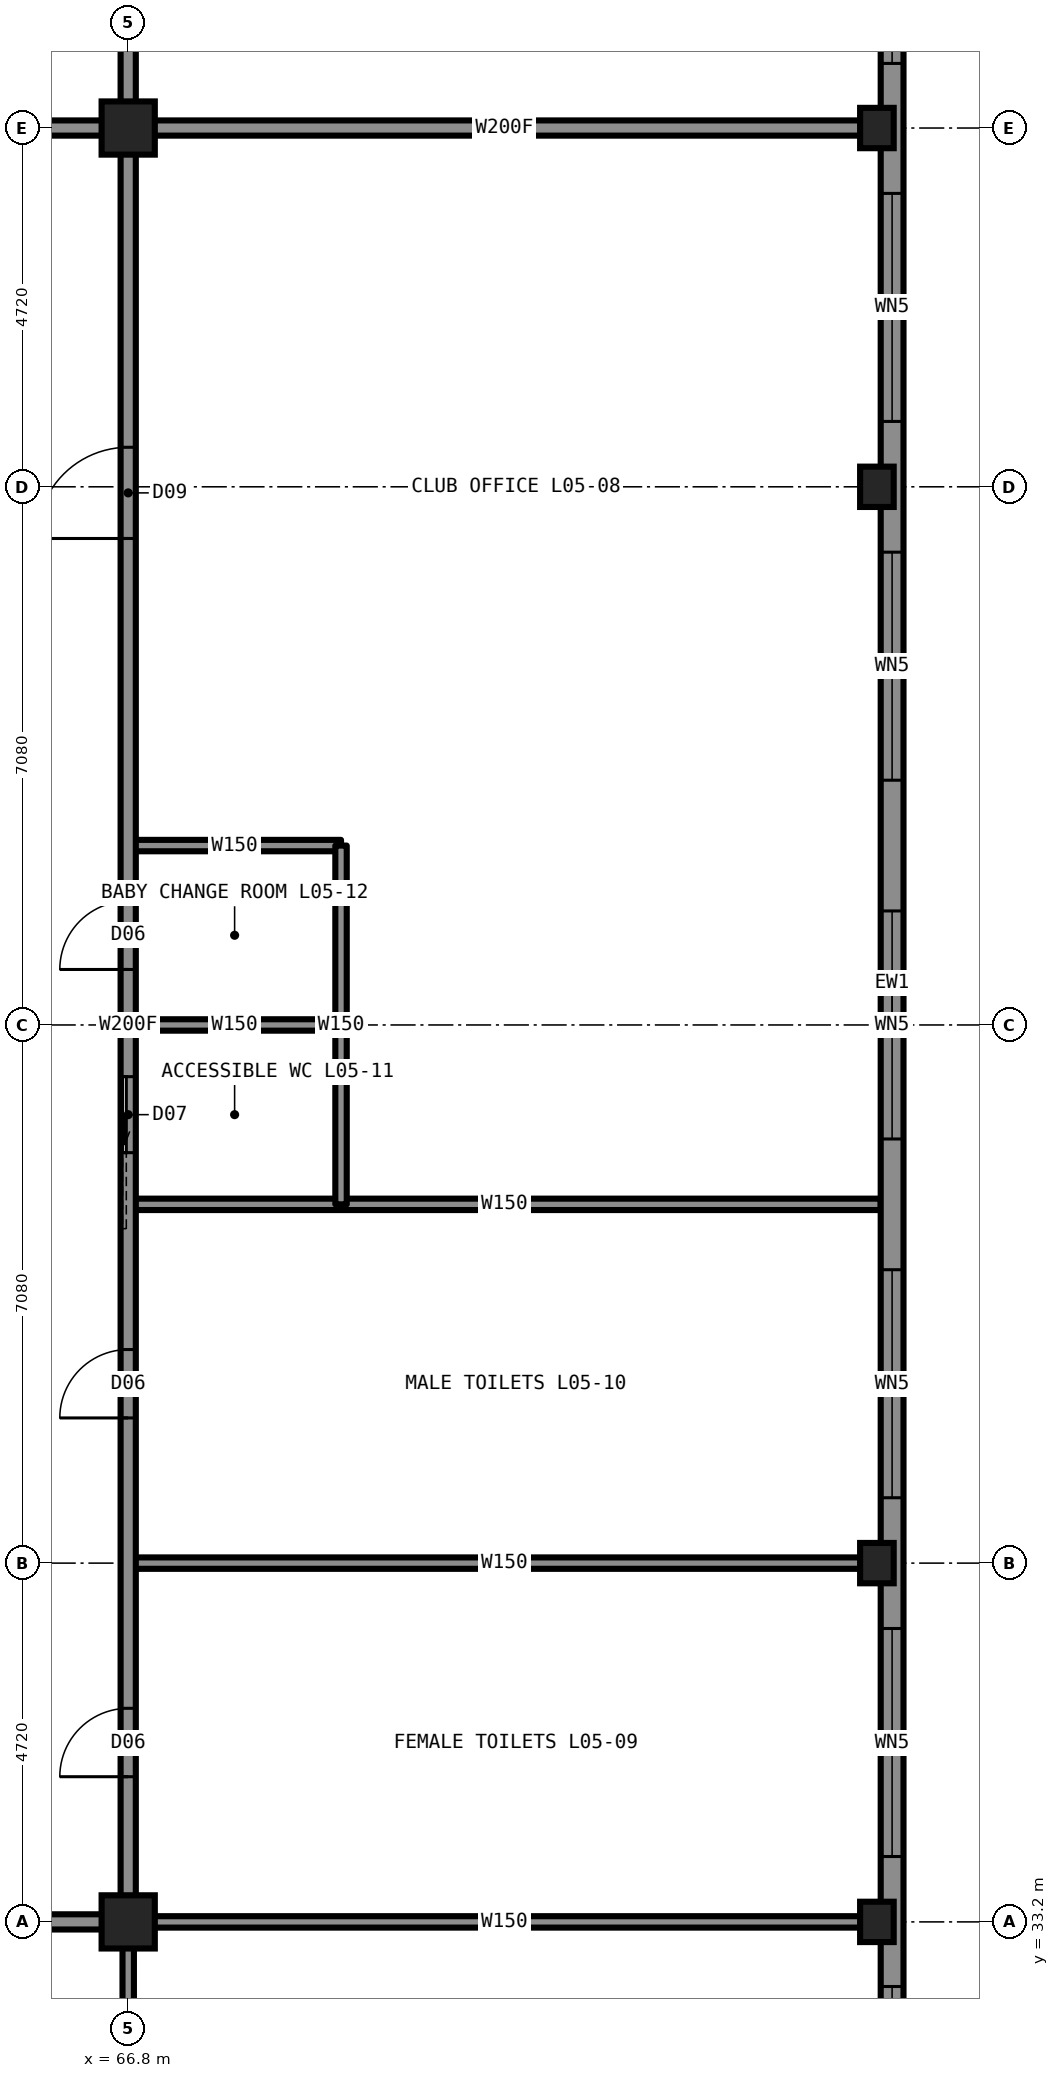
"""IFC4 building model, lengths in metres.
Left out: names, types, materials, properties, quantities, classifications, styles, units other than length and angle.
Written with IfcOpenShell. Run it as: python <this file> out.ifc"""

import sys

from ifc_helpers import new_model, si_unit, direction, frame, frame_2d, origin, origin_2d, place, context, subcontext, project, spatial, rectangle, hollow_rectangle, i_section, extrude, element, fill, save


model = new_model("IFC4")
c1 = context("Model", 3, precision=1e-05, world=origin(), true_north=direction((0.0, 1.0)))
c2 = subcontext(c1, "Body", "Model", "MODEL_VIEW")
j1 = project(units=[si_unit("LENGTHUNIT", "METRE"), si_unit("PLANEANGLEUNIT", "RADIAN")], contexts=[c1])
p1 = place(None, origin())
s1 = spatial("IfcSite", under=j1, at=p1, CompositionType="ELEMENT")
p2 = place(p1, origin())
s2 = spatial("IfcBuilding", under=s1, at=p2, CompositionType="ELEMENT")
p3 = place(p2, frame((0.0, 0.0, 25.0)))
s3 = spatial("IfcBuildingStorey", under=s2, at=p3, CompositionType="ELEMENT", Elevation=25.0)
for number, where, z_axis, x_axis in (
    (1, (76.65, 33.2, 0.0), (0.0, 0.0, 1.0), (1.0, 0.0, 0.0)),
    (2, (76.65, 37.92, 0.0), (0.0, 0.0, 1.0), (1.0, 0.0, 0.0)),
    (3, (76.65, 52.08, 0.0), (0.0, 0.0, 1.0), (1.0, 0.0, 0.0)),
    (4, (76.65, 56.8, 0.0), (0.0, 0.0, 1.0), (1.0, 0.0, 0.0)),
):
    element("IfcColumn", number, at=place(p3, frame(where, z_axis=z_axis, x_axis=x_axis)), inside=s3, PredefinedType="COLUMN", context=c2, shape_type="SweptSolid", body=[
        extrude(i_section(OverallWidth=0.442, OverallDepth=0.531, WebThickness=0.066, FlangeThickness=0.106, at=origin_2d()), origin(), (0.0, 0.0, 1.0), 3.5),
    ])
for number, where, z_axis, x_axis in (
    (5, (66.8, 33.2, 0.0), (0.0, 0.0, 1.0), (1.0, 0.0, 0.0)),
    (6, (66.8, 56.8, 0.0), (0.0, 0.0, 1.0), (1.0, 0.0, 0.0)),
):
    element("IfcColumn", number, at=place(p3, frame(where, z_axis=z_axis, x_axis=x_axis)), inside=s3, PredefinedType="COLUMN", context=c2, shape_type="SweptSolid", body=[
        extrude(hollow_rectangle(XDim=0.7, YDim=0.7, WallThickness=0.06, at=origin_2d()), origin(), (0.0, 0.0, 1.0), 3.5),
    ])
p4 = place(p3, frame((43.2, 33.2, 0.0), z_axis=(0.0, 0.0, 1.0), x_axis=(1.0, 0.0, 0.0)))
e7 = element("IfcWall", 7, at=p4, inside=s3, PredefinedType="PARTITIONING", context=c2, shape_type="SweptSolid", body=[
    extrude(rectangle(XDim=23.6, YDim=0.2, at=frame_2d((11.8, 0.0))), origin(), (0.0, 0.0, 1.0), 3.33),
])
p5 = place(p4, frame((4.9, 0.0, 0.0)))
e8 = element("IfcOpeningElement", 8, at=p5, cuts=e7, PredefinedType="OPENING", context=c2, shape_type="SweptSolid", body=[
    extrude(rectangle(XDim=1.8, YDim=2.2, at=frame_2d((0.9, 1.1))), frame((0.0, 0.11, 0.0), z_axis=(0.0, -1.0, 0.0), x_axis=(1.0, 0.0, 0.0)), (0.0, 0.0, 1.0), 0.22),
])
p6 = place(p3, frame((66.8, 33.2, 0.0), z_axis=(0.0, 0.0, 1.0), x_axis=(1.0, 0.0, 0.0)))
e9 = element("IfcWall", 9, at=p6, inside=s3, PredefinedType="PARTITIONING", context=c2, shape_type="SweptSolid", body=[
    extrude(rectangle(XDim=9.9, YDim=0.15, at=frame_2d((4.95, 0.0))), origin(), (0.0, 0.0, 1.0), 2.573),
])
p7 = place(p3, frame((66.8, 42.64, 0.0), z_axis=(0.0, 0.0, 1.0), x_axis=(1.0, 0.0, 0.0)))
e10 = element("IfcWall", 10, at=p7, inside=s3, PredefinedType="PARTITIONING", context=c2, shape_type="SweptSolid", body=[
    extrude(rectangle(XDim=9.9, YDim=0.15, at=frame_2d((4.95, 0.0))), origin(), (0.0, 0.0, 1.0), 2.723),
])
p8 = place(p3, frame((66.8, 37.92, 0.0), z_axis=(0.0, 0.0, 1.0), x_axis=(1.0, 0.0, 0.0)))
e11 = element("IfcWall", 11, at=p8, inside=s3, PredefinedType="PARTITIONING", context=c2, shape_type="SweptSolid", body=[
    extrude(rectangle(XDim=9.9, YDim=0.15, at=frame_2d((4.95, 0.0))), origin(), (0.0, 0.0, 1.0), 2.573),
])
p9 = place(p3, frame((66.8, 45.0, 0.0), z_axis=(0.0, 0.0, 1.0), x_axis=(1.0, 0.0, 0.0)))
e12 = element("IfcWall", 12, at=p9, inside=s3, PredefinedType="PARTITIONING", context=c2, shape_type="SweptSolid", body=[
    extrude(rectangle(XDim=2.8, YDim=0.15, at=frame_2d((1.4, 0.0))), origin(), (0.0, 0.0, 1.0), 2.723),
])
p10 = place(p3, frame((43.2, 56.8, 0.0), z_axis=(0.0, 0.0, 1.0), x_axis=(1.0, 0.0, 0.0)))
e13 = element("IfcWall", 13, at=p10, inside=s3, PredefinedType="PARTITIONING", context=c2, shape_type="SweptSolid", body=[
    extrude(rectangle(XDim=23.6, YDim=0.2, at=frame_2d((11.8, 0.0))), origin(), (0.0, 0.0, 1.0), 3.33),
])
p11 = place(p10, frame((4.9, 0.0, 0.0)))
e14 = element("IfcOpeningElement", 14, at=p11, cuts=e13, PredefinedType="OPENING", context=c2, shape_type="SweptSolid", body=[
    extrude(rectangle(XDim=1.8, YDim=2.2, at=frame_2d((0.9, 1.1))), frame((0.0, 0.11, 0.0), z_axis=(0.0, -1.0, 0.0), x_axis=(1.0, 0.0, 0.0)), (0.0, 0.0, 1.0), 0.22),
])
p12 = place(p3, frame((66.8, 56.8, 0.0), z_axis=(0.0, 0.0, 1.0), x_axis=(1.0, 0.0, 0.0)))
e15 = element("IfcWall", 15, at=p12, inside=s3, PredefinedType="PARTITIONING", context=c2, shape_type="SweptSolid", body=[
    extrude(rectangle(XDim=9.9, YDim=0.2, at=frame_2d((4.95, 0.0))), origin(), (0.0, 0.0, 1.0), 2.573),
])
p13 = place(p3, frame((66.8, 47.36, 0.0), z_axis=(0.0, 0.0, 1.0), x_axis=(1.0, 0.0, 0.0)))
e16 = element("IfcWall", 16, at=p13, inside=s3, PredefinedType="PARTITIONING", context=c2, shape_type="SweptSolid", body=[
    extrude(rectangle(XDim=2.8, YDim=0.15, at=frame_2d((1.4, 0.0))), origin(), (0.0, 0.0, 1.0), 2.723),
])
p14 = place(p3, frame((66.8, 33.2, 0.0), z_axis=(0.0, 0.0, 1.0), x_axis=(0.0, 1.0, 0.0)))
e17 = element("IfcWall", 17, at=p14, inside=s3, PredefinedType="PARTITIONING", context=c2, shape_type="SweptSolid", body=[
    extrude(rectangle(XDim=23.6, YDim=0.2, at=frame_2d((11.8, 0.0))), origin(), (0.0, 0.0, 1.0), 3.33),
])
p15 = place(p14, frame((18.2, 0.0, 0.0)))
e18 = element("IfcOpeningElement", 18, at=p15, cuts=e17, PredefinedType="OPENING", context=c2, shape_type="SweptSolid", body=[
    extrude(rectangle(XDim=1.2, YDim=2.2, at=frame_2d((0.6, 1.1))), frame((0.0, 0.11, 0.0), z_axis=(0.0, -1.0, 0.0), x_axis=(1.0, 0.0, 0.0)), (0.0, 0.0, 1.0), 0.22),
])
p16 = place(p14, frame((10.12, 0.0, 0.0)))
e19 = element("IfcOpeningElement", 19, at=p16, cuts=e17, PredefinedType="OPENING", context=c2, shape_type="SweptSolid", body=[
    extrude(rectangle(XDim=1.0, YDim=2.1, at=frame_2d((0.5, 1.05))), frame((0.0, 0.11, 0.0), z_axis=(0.0, -1.0, 0.0), x_axis=(1.0, 0.0, 0.0)), (0.0, 0.0, 1.0), 0.22),
])
p17 = place(p14, frame((12.53, 0.0, 0.0)))
e20 = element("IfcOpeningElement", 20, at=p17, cuts=e17, PredefinedType="OPENING", context=c2, shape_type="SweptSolid", body=[
    extrude(rectangle(XDim=0.9, YDim=2.1, at=frame_2d((0.45, 1.05))), frame((0.0, 0.11, 0.0), z_axis=(0.0, -1.0, 0.0), x_axis=(1.0, 0.0, 0.0)), (0.0, 0.0, 1.0), 0.22),
])
p18 = place(p14, frame((1.91, 0.0, 0.0)))
e21 = element("IfcOpeningElement", 21, at=p18, cuts=e17, PredefinedType="OPENING", context=c2, shape_type="SweptSolid", body=[
    extrude(rectangle(XDim=0.9, YDim=2.1, at=frame_2d((0.45, 1.05))), frame((0.0, 0.11, 0.0), z_axis=(0.0, -1.0, 0.0), x_axis=(1.0, 0.0, 0.0)), (0.0, 0.0, 1.0), 0.22),
])
p19 = place(p14, frame((6.63, 0.0, 0.0)))
e22 = element("IfcOpeningElement", 22, at=p19, cuts=e17, PredefinedType="OPENING", context=c2, shape_type="SweptSolid", body=[
    extrude(rectangle(XDim=0.9, YDim=2.1, at=frame_2d((0.45, 1.05))), frame((0.0, 0.11, 0.0), z_axis=(0.0, -1.0, 0.0), x_axis=(1.0, 0.0, 0.0)), (0.0, 0.0, 1.0), 0.22),
])
p20 = place(p3, frame((66.8, 56.8, 0.0), z_axis=(0.0, 0.0, 1.0), x_axis=(0.0, 1.0, 0.0)))
e23 = element("IfcWall", 23, at=p20, inside=s3, PredefinedType="PARTITIONING", context=c2, shape_type="SweptSolid", body=[
    extrude(rectangle(XDim=9.9, YDim=0.2, at=frame_2d((4.95, 0.0))), origin(), (0.0, 0.0, 1.0), 2.573),
])
p21 = place(p20, frame((3.7, 0.0, 0.0)))
e24 = element("IfcOpeningElement", 24, at=p21, cuts=e23, PredefinedType="OPENING", context=c2, shape_type="SweptSolid", body=[
    extrude(rectangle(XDim=1.0, YDim=2.1, at=frame_2d((0.5, 1.05))), frame((0.0, 0.11, 0.0), z_axis=(0.0, -1.0, 0.0), x_axis=(1.0, 0.0, 0.0)), (0.0, 0.0, 1.0), 0.22),
])
p22 = place(p3, frame((66.8, 23.3, 0.0), z_axis=(0.0, 0.0, 1.0), x_axis=(0.0, 1.0, 0.0)))
e25 = element("IfcWall", 25, at=p22, inside=s3, PredefinedType="PARTITIONING", context=c2, shape_type="SweptSolid", body=[
    extrude(rectangle(XDim=9.9, YDim=0.15, at=frame_2d((4.95, 0.0))), origin(), (0.0, 0.0, 1.0), 2.573),
])
p23 = place(p22, frame((5.1, 0.0, 0.0)))
e26 = element("IfcOpeningElement", 26, at=p23, cuts=e25, PredefinedType="OPENING", context=c2, shape_type="SweptSolid", body=[
    extrude(rectangle(XDim=1.2, YDim=2.2, at=frame_2d((0.6, 1.1))), frame((0.0, 0.085, 0.0), z_axis=(0.0, -1.0, 0.0), x_axis=(1.0, 0.0, 0.0)), (0.0, 0.0, 1.0), 0.17),
])
p24 = place(p3, frame((69.6, 42.64, 0.0), z_axis=(0.0, 0.0, 1.0), x_axis=(0.0, 1.0, 0.0)))
e27 = element("IfcWall", 27, at=p24, inside=s3, PredefinedType="PARTITIONING", context=c2, shape_type="SweptSolid", body=[
    extrude(rectangle(XDim=4.72, YDim=0.15, at=frame_2d((2.36, 0.0))), origin(), (0.0, 0.0, 1.0), 3.33),
])
p25 = place(p3, frame((76.85, 28.5, 0.0), z_axis=(0.0, 0.0, 1.0), x_axis=(0.0, 1.0, 0.0)))
e28 = element("IfcWall", 28, at=p25, inside=s3, PredefinedType="SOLIDWALL", context=c2, shape_type="SweptSolid", body=[
    extrude(rectangle(XDim=33.0, YDim=0.3, at=frame_2d((16.5, 0.0))), origin(), (0.0, 0.0, 1.0), 2.83),
])
p26 = place(p25, frame((0.85, 0.0, 0.3)))
e29 = element("IfcOpeningElement", 29, at=p26, cuts=e28, PredefinedType="OPENING", context=c2, shape_type="SweptSolid", body=[
    extrude(rectangle(XDim=3.0, YDim=2.5, at=frame_2d((1.5, 1.25))), frame((0.0, 0.16, 0.0), z_axis=(0.0, -1.0, 0.0), x_axis=(1.0, 0.0, 0.0)), (0.0, 0.0, 1.0), 0.32),
])
p27 = place(p25, frame((5.56, 0.0, 0.3)))
e30 = element("IfcOpeningElement", 30, at=p27, cuts=e28, PredefinedType="OPENING", context=c2, shape_type="SweptSolid", body=[
    extrude(rectangle(XDim=3.0, YDim=2.5, at=frame_2d((1.5, 1.25))), frame((0.0, 0.16, 0.0), z_axis=(0.0, -1.0, 0.0), x_axis=(1.0, 0.0, 0.0)), (0.0, 0.0, 1.0), 0.32),
])
p28 = place(p25, frame((10.28, 0.0, 0.3)))
e31 = element("IfcOpeningElement", 31, at=p28, cuts=e28, PredefinedType="OPENING", context=c2, shape_type="SweptSolid", body=[
    extrude(rectangle(XDim=3.0, YDim=2.5, at=frame_2d((1.5, 1.25))), frame((0.0, 0.16, 0.0), z_axis=(0.0, -1.0, 0.0), x_axis=(1.0, 0.0, 0.0)), (0.0, 0.0, 1.0), 0.32),
])
p29 = place(p25, frame((15.0, 0.0, 0.3)))
e32 = element("IfcOpeningElement", 32, at=p29, cuts=e28, PredefinedType="OPENING", context=c2, shape_type="SweptSolid", body=[
    extrude(rectangle(XDim=3.0, YDim=2.5, at=frame_2d((1.5, 1.25))), frame((0.0, 0.16, 0.0), z_axis=(0.0, -1.0, 0.0), x_axis=(1.0, 0.0, 0.0)), (0.0, 0.0, 1.0), 0.32),
])
p30 = place(p25, frame((19.72, 0.0, 0.3)))
e33 = element("IfcOpeningElement", 33, at=p30, cuts=e28, PredefinedType="OPENING", context=c2, shape_type="SweptSolid", body=[
    extrude(rectangle(XDim=3.0, YDim=2.5, at=frame_2d((1.5, 1.25))), frame((0.0, 0.16, 0.0), z_axis=(0.0, -1.0, 0.0), x_axis=(1.0, 0.0, 0.0)), (0.0, 0.0, 1.0), 0.32),
])
p31 = place(p25, frame((24.44, 0.0, 0.3)))
e34 = element("IfcOpeningElement", 34, at=p31, cuts=e28, PredefinedType="OPENING", context=c2, shape_type="SweptSolid", body=[
    extrude(rectangle(XDim=3.0, YDim=2.5, at=frame_2d((1.5, 1.25))), frame((0.0, 0.16, 0.0), z_axis=(0.0, -1.0, 0.0), x_axis=(1.0, 0.0, 0.0)), (0.0, 0.0, 1.0), 0.32),
])
p32 = place(p25, frame((29.15, 0.0, 0.3)))
e35 = element("IfcOpeningElement", 35, at=p32, cuts=e28, PredefinedType="OPENING", context=c2, shape_type="SweptSolid", body=[
    extrude(rectangle(XDim=3.0, YDim=2.5, at=frame_2d((1.5, 1.25))), frame((0.0, 0.16, 0.0), z_axis=(0.0, -1.0, 0.0), x_axis=(1.0, 0.0, 0.0)), (0.0, 0.0, 1.0), 0.32),
])
p33 = place(p15, origin())
e36 = element("IfcDoor", 36, at=p33, inside=s3, OperationType="SINGLE_SWING_LEFT", PredefinedType="DOOR", context=c2, shape_type="SweptSolid", body=[
    extrude(rectangle(XDim=1.2, YDim=2.2, at=frame_2d((0.6, 1.1))), frame((0.0, 0.025, 0.0), z_axis=(0.0, -1.0, 0.0), x_axis=(1.0, 0.0, 0.0)), (0.0, 0.0, 1.0), 0.05),
])
fill(e18, e36)
p34 = place(p16, origin())
e37 = element("IfcDoor", 37, at=p34, inside=s3, OperationType="SLIDING_TO_LEFT", PredefinedType="DOOR", context=c2, shape_type="SweptSolid", body=[
    extrude(rectangle(XDim=1.0, YDim=2.1, at=frame_2d((0.5, 1.05))), frame((0.0, 0.025, 0.0), z_axis=(0.0, -1.0, 0.0), x_axis=(1.0, 0.0, 0.0)), (0.0, 0.0, 1.0), 0.05),
])
fill(e19, e37)
p35 = place(p17, origin())
e38 = element("IfcDoor", 38, at=p35, inside=s3, OperationType="SINGLE_SWING_LEFT", PredefinedType="DOOR", context=c2, shape_type="SweptSolid", body=[
    extrude(rectangle(XDim=0.9, YDim=2.1, at=frame_2d((0.45, 1.05))), frame((0.0, 0.025, 0.0), z_axis=(0.0, -1.0, 0.0), x_axis=(1.0, 0.0, 0.0)), (0.0, 0.0, 1.0), 0.05),
])
fill(e20, e38)
p36 = place(p18, origin())
e39 = element("IfcDoor", 39, at=p36, inside=s3, OperationType="SINGLE_SWING_LEFT", PredefinedType="DOOR", context=c2, shape_type="SweptSolid", body=[
    extrude(rectangle(XDim=0.9, YDim=2.1, at=frame_2d((0.45, 1.05))), frame((0.0, 0.025, 0.0), z_axis=(0.0, -1.0, 0.0), x_axis=(1.0, 0.0, 0.0)), (0.0, 0.0, 1.0), 0.05),
])
fill(e21, e39)
p37 = place(p19, origin())
e40 = element("IfcDoor", 40, at=p37, inside=s3, OperationType="SINGLE_SWING_LEFT", PredefinedType="DOOR", context=c2, shape_type="SweptSolid", body=[
    extrude(rectangle(XDim=0.9, YDim=2.1, at=frame_2d((0.45, 1.05))), frame((0.0, 0.025, 0.0), z_axis=(0.0, -1.0, 0.0), x_axis=(1.0, 0.0, 0.0)), (0.0, 0.0, 1.0), 0.05),
])
fill(e22, e40)
p38 = place(p26, origin())
e41 = element("IfcWindow", 41, at=p38, inside=s3, PartitioningType="SINGLE_PANEL", PredefinedType="WINDOW", context=c2, shape_type="SweptSolid", body=[
    extrude(rectangle(XDim=3.0, YDim=2.5, at=frame_2d((1.5, 1.25))), frame((0.0, 0.03, 0.0), z_axis=(0.0, -1.0, 0.0), x_axis=(1.0, 0.0, 0.0)), (0.0, 0.0, 1.0), 0.06),
])
fill(e29, e41)
p39 = place(p27, origin())
e42 = element("IfcWindow", 42, at=p39, inside=s3, PartitioningType="SINGLE_PANEL", PredefinedType="WINDOW", context=c2, shape_type="SweptSolid", body=[
    extrude(rectangle(XDim=3.0, YDim=2.5, at=frame_2d((1.5, 1.25))), frame((0.0, 0.03, 0.0), z_axis=(0.0, -1.0, 0.0), x_axis=(1.0, 0.0, 0.0)), (0.0, 0.0, 1.0), 0.06),
])
fill(e30, e42)
p40 = place(p28, origin())
e43 = element("IfcWindow", 43, at=p40, inside=s3, PartitioningType="SINGLE_PANEL", PredefinedType="WINDOW", context=c2, shape_type="SweptSolid", body=[
    extrude(rectangle(XDim=3.0, YDim=2.5, at=frame_2d((1.5, 1.25))), frame((0.0, 0.03, 0.0), z_axis=(0.0, -1.0, 0.0), x_axis=(1.0, 0.0, 0.0)), (0.0, 0.0, 1.0), 0.06),
])
fill(e31, e43)
p41 = place(p29, origin())
e44 = element("IfcWindow", 44, at=p41, inside=s3, PartitioningType="SINGLE_PANEL", PredefinedType="WINDOW", context=c2, shape_type="SweptSolid", body=[
    extrude(rectangle(XDim=3.0, YDim=2.5, at=frame_2d((1.5, 1.25))), frame((0.0, 0.03, 0.0), z_axis=(0.0, -1.0, 0.0), x_axis=(1.0, 0.0, 0.0)), (0.0, 0.0, 1.0), 0.06),
])
fill(e32, e44)
p42 = place(p30, origin())
e45 = element("IfcWindow", 45, at=p42, inside=s3, PartitioningType="SINGLE_PANEL", PredefinedType="WINDOW", context=c2, shape_type="SweptSolid", body=[
    extrude(rectangle(XDim=3.0, YDim=2.5, at=frame_2d((1.5, 1.25))), frame((0.0, 0.03, 0.0), z_axis=(0.0, -1.0, 0.0), x_axis=(1.0, 0.0, 0.0)), (0.0, 0.0, 1.0), 0.06),
])
fill(e33, e45)
p43 = place(p31, origin())
e46 = element("IfcWindow", 46, at=p43, inside=s3, PartitioningType="SINGLE_PANEL", PredefinedType="WINDOW", context=c2, shape_type="SweptSolid", body=[
    extrude(rectangle(XDim=3.0, YDim=2.5, at=frame_2d((1.5, 1.25))), frame((0.0, 0.03, 0.0), z_axis=(0.0, -1.0, 0.0), x_axis=(1.0, 0.0, 0.0)), (0.0, 0.0, 1.0), 0.06),
])
fill(e34, e46)
p44 = place(p32, origin())
e47 = element("IfcWindow", 47, at=p44, inside=s3, PartitioningType="SINGLE_PANEL", PredefinedType="WINDOW", context=c2, shape_type="SweptSolid", body=[
    extrude(rectangle(XDim=3.0, YDim=2.5, at=frame_2d((1.5, 1.25))), frame((0.0, 0.03, 0.0), z_axis=(0.0, -1.0, 0.0), x_axis=(1.0, 0.0, 0.0)), (0.0, 0.0, 1.0), 0.06),
])
fill(e35, e47)
save(model, sys.argv[1])
